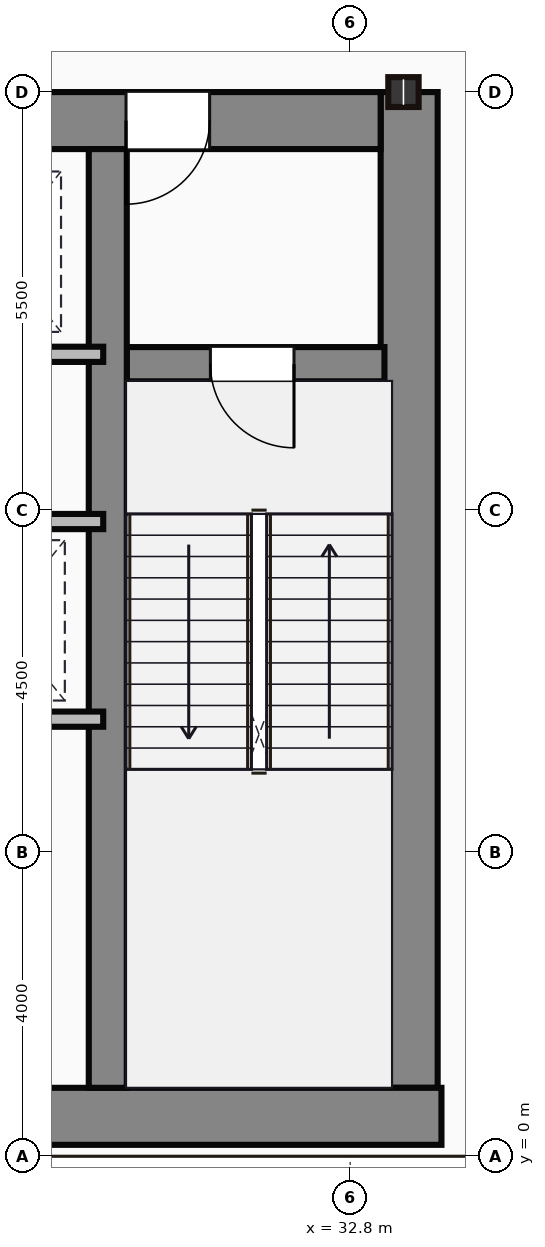
"""IFC4 building model, lengths in metres.
Left out: names, types, materials, properties, quantities, classifications, styles, units other than length and angle.
Written with IfcOpenShell. Run it as: python <this file> out.ifc"""

import sys

from ifc_helpers import new_model, si_unit, direction, frame, frame_2d, origin, origin_2d, place, context, subcontext, project, spatial, rectangle, i_section, extrude, source, transform, mapped, element, fill, save


model = new_model("IFC4")
c1 = context("Model", 3, precision=1e-05, world=origin(), true_north=direction((0.0, 1.0)))
c2 = subcontext(c1, "Body", "Model", "MODEL_VIEW")
j1 = project(units=[si_unit("LENGTHUNIT", "METRE"), si_unit("PLANEANGLEUNIT", "RADIAN")], contexts=[c1])
p1 = place(None, origin())
s1 = spatial("IfcSite", under=j1, at=p1, CompositionType="ELEMENT")
p2 = place(p1, origin())
s2 = spatial("IfcBuilding", under=s1, at=p2, CompositionType="ELEMENT")
p3 = place(p2, frame((0.0, 0.0, 136.1)))
s3 = spatial("IfcBuildingStorey", under=s2, at=p3, CompositionType="ELEMENT", Elevation=136.1)
m1 = source(origin(), c2, "Body", "SweptSolid", [
    extrude(rectangle(XDim=29.5, YDim=0.75, at=frame_2d((14.75, 0.0))), origin(), (0.0, 0.0, 1.0), 4.5),
])
p4 = place(p3, frame((4.5, 0.525, 0.0), z_axis=(0.0, 0.0, 1.0), x_axis=(1.0, 0.0, 0.0)))
e1 = element("IfcWall", 1, at=p4, inside=s3, PredefinedType="SHEAR", context=c2, shape_type="MappedRepresentation", body=[
    mapped(m1, transform((0.0, 0.0, 0.0))),
])
m2 = source(origin(), c2, "Body", "SweptSolid", [
    extrude(rectangle(XDim=13.1, YDim=0.75, at=frame_2d((6.55, 0.0))), origin(), (0.0, 0.0, 1.0), 4.5),
])
p5 = place(p3, frame((33.575, 0.9, 0.0), z_axis=(0.0, 0.0, 1.0), x_axis=(0.0, 1.0, 0.0)))
e2 = element("IfcWall", 2, at=p5, inside=s3, PredefinedType="SHEAR", context=c2, shape_type="MappedRepresentation", body=[
    mapped(m2, transform((0.0, 0.0, 0.0))),
])
m3 = source(origin(), c2, "Body", "SweptSolid", [
    extrude(rectangle(XDim=12.6, YDim=0.75, at=frame_2d((6.3, 0.0))), origin(), (0.0, 0.0, 1.0), 4.5),
])
p6 = place(p3, frame((20.6, 13.625, 0.0), z_axis=(0.0, 0.0, 1.0), x_axis=(1.0, 0.0, 0.0)))
e3 = element("IfcWall", 3, at=p6, inside=s3, PredefinedType="SHEAR", context=c2, shape_type="MappedRepresentation", body=[
    mapped(m3, transform((0.0, 0.0, 0.0))),
])
p7 = place(p6, frame((9.25, 0.0, 0.0)))
e4 = element("IfcOpeningElement", 4, at=p7, cuts=e3, PredefinedType="OPENING", context=c2, shape_type="SweptSolid", body=[
    extrude(rectangle(XDim=1.1, YDim=2.15, at=frame_2d((0.55, 1.075))), frame((0.0, 0.385, 0.0), z_axis=(0.0, -1.0, 0.0), x_axis=(1.0, 0.0, 0.0)), (0.0, 0.0, 1.0), 0.77),
])
m4 = source(origin(), c2, "Body", "SweptSolid", [
    extrude(rectangle(XDim=12.35, YDim=0.5, at=frame_2d((6.175, 0.0))), origin(), (0.0, 0.0, 1.0), 4.5),
])
p8 = place(p3, frame((29.61, 0.9, 0.0), z_axis=(0.0, 0.0, 1.0), x_axis=(0.0, 1.0, 0.0)))
e5 = element("IfcWall", 5, at=p8, inside=s3, PredefinedType="SHEAR", context=c2, shape_type="MappedRepresentation", body=[
    mapped(m4, transform((0.0, 0.0, 0.0))),
])
m5 = source(origin(), c2, "Body", "SweptSolid", [
    extrude(rectangle(XDim=3.39, YDim=0.45, at=frame_2d((1.695, 0.0))), origin(), (0.0, 0.0, 1.0), 4.5),
])
p9 = place(p3, frame((29.86, 10.42, 0.0), z_axis=(0.0, 0.0, 1.0), x_axis=(1.0, 0.0, 0.0)))
e6 = element("IfcWall", 6, at=p9, inside=s3, PredefinedType="SHEAR", context=c2, shape_type="MappedRepresentation", body=[
    mapped(m5, transform((0.0, 0.0, 0.0))),
])
p10 = place(p9, frame((1.1, 0.0, 0.0)))
e7 = element("IfcOpeningElement", 7, at=p10, cuts=e6, PredefinedType="OPENING", context=c2, shape_type="SweptSolid", body=[
    extrude(rectangle(XDim=1.1, YDim=2.15, at=frame_2d((0.55, 1.075))), frame((0.0, 0.235, 0.0), z_axis=(0.0, -1.0, 0.0), x_axis=(1.0, 0.0, 0.0)), (0.0, 0.0, 1.0), 0.47),
])
m6 = source(origin(), c2, "Body", "SweptSolid", [
    extrude(i_section(OverallWidth=0.399, OverallDepth=0.393, WebThickness=0.023, FlangeThickness=0.037, at=origin_2d()), origin(), (0.0, 0.0, 1.0), 4.5),
])
p11 = place(p3, frame((33.5, 14.0, 0.0), z_axis=(0.0, 0.0, 1.0), x_axis=(1.0, 0.0, 0.0)))
e8 = element("IfcColumn", 8, at=p11, inside=s3, PredefinedType="COLUMN", context=c2, shape_type="MappedRepresentation", body=[
    mapped(m6, transform((0.0, 0.0, 0.0))),
])
m7 = source(origin(), c2, "Body", "SweptSolid", [
    extrude(rectangle(XDim=8.8, YDim=0.2, at=frame_2d((4.4, 0.0))), origin(), (0.0, 0.0, 1.0), 4.25),
])
p12 = place(p3, frame((20.75, 10.55, 0.0), z_axis=(0.0, 0.0, 1.0), x_axis=(1.0, 0.0, 0.0)))
e9 = element("IfcWall", 9, at=p12, inside=s3, PredefinedType="PARTITIONING", context=c2, shape_type="MappedRepresentation", body=[
    mapped(m7, transform((0.0, 0.0, 0.0))),
])
m8 = source(origin(), c2, "Body", "SweptSolid", [
    extrude(rectangle(XDim=4.55, YDim=0.2, at=frame_2d((2.275, 0.0))), origin(), (0.0, 0.0, 1.0), 4.25),
])
for number, where, z_axis, x_axis in (
    (10, (25.0, 8.35, 0.0), (0.0, 0.0, 1.0), (1.0, 0.0, 0.0)),
    (11, (25.0, 5.75, 0.0), (0.0, 0.0, 1.0), (1.0, 0.0, 0.0)),
):
    element("IfcWall", number, at=place(p3, frame(where, z_axis=z_axis, x_axis=x_axis)), inside=s3, PredefinedType="PARTITIONING", context=c2, shape_type="MappedRepresentation", body=[
        mapped(m8, transform((0.0, 0.0, 0.0))),
    ])
m9 = source(origin(), c2, "Body", "SweptSolid", [
    extrude(rectangle(XDim=1.1, YDim=2.15, at=frame_2d((0.55, 1.075))), frame((0.0, 0.025, 0.0), z_axis=(0.0, -1.0, 0.0), x_axis=(1.0, 0.0, 0.0)), (0.0, 0.0, 1.0), 0.05),
])
p13 = place(p10, frame((1.1, 0.0, 0.0), z_axis=(0.0, 0.0, 1.0), x_axis=(-1.0, 0.0, 0.0)))
e12 = element("IfcDoor", 12, at=p13, inside=s3, OperationType="SINGLE_SWING_RIGHT", PredefinedType="DOOR", context=c2, shape_type="MappedRepresentation", body=[
    mapped(m9, transform((0.0, 0.0, 0.0))),
])
fill(e7, e12)
p14 = place(p7, origin())
e13 = element("IfcDoor", 13, at=p14, inside=s3, OperationType="SINGLE_SWING_LEFT", PredefinedType="DOOR", context=c2, shape_type="MappedRepresentation", body=[
    mapped(m9, transform((0.0, 0.0, 0.0))),
])
fill(e4, e13)
save(model, sys.argv[1])
